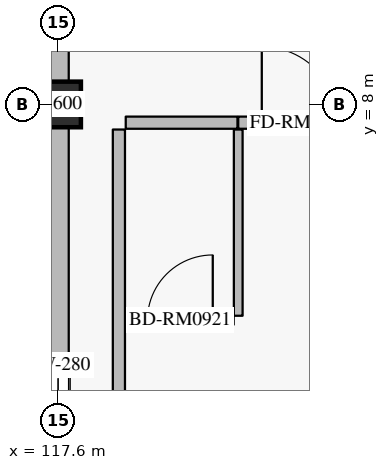
"""IFC4 building model, lengths in metres.
Left out: names, types, materials, properties, quantities, classifications, styles, units other than length and angle.
Written with IfcOpenShell. Run it as: python <this file> out.ifc"""

import sys

from ifc_helpers import new_model, si_unit, direction, frame, frame_2d, origin, origin_2d, place, context, subcontext, project, spatial, rectangle, extrude, element, fill, save


model = new_model("IFC4")
c1 = context("Model", 3, precision=1e-05, world=origin(), true_north=direction((0.0, 1.0)))
c2 = subcontext(c1, "Body", "Model", "MODEL_VIEW")
j1 = project(units=[si_unit("LENGTHUNIT", "METRE"), si_unit("PLANEANGLEUNIT", "RADIAN")], contexts=[c1])
p1 = place(None, origin())
s1 = spatial("IfcSite", under=j1, at=p1, CompositionType="ELEMENT")
p2 = place(p1, origin())
s2 = spatial("IfcBuilding", under=s1, at=p2, CompositionType="ELEMENT")
p3 = place(p2, frame((0.0, 0.0, 36.0)))
s3 = spatial("IfcBuildingStorey", under=s2, at=p3, CompositionType="ELEMENT", Elevation=36.0)
p4 = place(p3, frame((117.6, 8.0, 0.0), z_axis=(0.0, 0.0, 1.0), x_axis=(1.0, 0.0, 0.0)))
e1 = element("IfcColumn", 1, at=p4, inside=s3, PredefinedType="COLUMN", context=c2, shape_type="SweptSolid", body=[
    extrude(rectangle(XDim=0.6, YDim=0.6, at=origin_2d()), origin(), (0.0, 0.0, 1.0), 3.6),
])
p5 = place(p3, frame((117.6, 0.35, 0.0), z_axis=(0.0, 0.0, 1.0), x_axis=(0.0, 1.0, 0.0)))
e2 = element("IfcWall", 2, at=p5, inside=s3, PredefinedType="SOLIDWALL", context=c2, shape_type="SweptSolid", body=[
    extrude(rectangle(XDim=7.35, YDim=0.28, at=frame_2d((3.675, 0.0))), origin(), (0.0, 0.0, 1.0), 2.7),
])
p6 = place(p5, frame((3.025, 0.0, 0.5)))
e3 = element("IfcOpeningElement", 3, at=p6, cuts=e2, PredefinedType="OPENING", context=c2, shape_type="SweptSolid", body=[
    extrude(rectangle(XDim=1.3, YDim=1.65, at=frame_2d((0.65, 0.825))), frame((0.0, 0.15, 0.0), z_axis=(0.0, -1.0, 0.0), x_axis=(1.0, 0.0, 0.0)), (0.0, 0.0, 1.0), 0.3),
])
p7 = place(p3, frame((117.6, 8.3, 0.0), z_axis=(0.0, 0.0, 1.0), x_axis=(0.0, 1.0, 0.0)))
e4 = element("IfcWall", 4, at=p7, inside=s3, PredefinedType="SOLIDWALL", context=c2, shape_type="SweptSolid", body=[
    extrude(rectangle(XDim=7.35, YDim=0.28, at=frame_2d((3.675, 0.0))), origin(), (0.0, 0.0, 1.0), 2.7),
])
p8 = place(p7, frame((3.025, 0.0, 0.5)))
e5 = element("IfcOpeningElement", 5, at=p8, cuts=e4, PredefinedType="OPENING", context=c2, shape_type="SweptSolid", body=[
    extrude(rectangle(XDim=1.3, YDim=1.65, at=frame_2d((0.65, 0.825))), frame((0.0, 0.15, 0.0), z_axis=(0.0, -1.0, 0.0), x_axis=(1.0, 0.0, 0.0)), (0.0, 0.0, 1.0), 0.3),
])
p9 = place(p3, frame((118.49, 7.76, 0.0), z_axis=(0.0, 0.0, 1.0), x_axis=(1.0, 0.0, 0.0)))
e6 = element("IfcWall", 6, at=p9, inside=s3, PredefinedType="PARTITIONING", context=c2, shape_type="SweptSolid", body=[
    extrude(rectangle(XDim=1.47, YDim=0.16, at=frame_2d((0.735, 0.0))), origin(), (0.0, 0.0, 1.0), 3.365),
])
p10 = place(p3, frame((119.97, 7.76, 0.0), z_axis=(0.0, 0.0, 1.0), x_axis=(1.0, 0.0, 0.0)))
e7 = element("IfcWall", 7, at=p10, inside=s3, PredefinedType="PARTITIONING", context=c2, shape_type="SweptSolid", body=[
    extrude(rectangle(XDim=1.62, YDim=0.16, at=frame_2d((0.81, 0.0))), origin(), (0.0, 0.0, 1.0), 3.365),
])
p11 = place(p10, frame((0.31, 0.0, 0.0)))
e8 = element("IfcOpeningElement", 8, at=p11, cuts=e7, PredefinedType="OPENING", context=c2, shape_type="SweptSolid", body=[
    extrude(rectangle(XDim=1.0, YDim=2.25, at=frame_2d((0.5, 1.125))), frame((0.0, 0.09, 0.0), z_axis=(0.0, -1.0, 0.0), x_axis=(1.0, 0.0, 0.0)), (0.0, 0.0, 1.0), 0.18),
])
p12 = place(p3, frame((119.97, 5.22, 0.0), z_axis=(0.0, 0.0, 1.0), x_axis=(0.0, 1.0, 0.0)))
e9 = element("IfcWall", 9, at=p12, inside=s3, PredefinedType="PARTITIONING", context=c2, shape_type="SweptSolid", body=[
    extrude(rectangle(XDim=2.45, YDim=0.115, at=frame_2d((1.225, 0.0))), origin(), (0.0, 0.0, 1.0), 3.365),
])
p13 = place(p3, frame((118.5, 5.16, 0.0), z_axis=(0.0, 0.0, 1.0), x_axis=(1.0, 0.0, 0.0)))
e10 = element("IfcWall", 10, at=p13, inside=s3, PredefinedType="PARTITIONING", context=c2, shape_type="SweptSolid", body=[
    extrude(rectangle(XDim=1.41, YDim=0.115, at=frame_2d((0.705, 0.0))), origin(), (0.0, 0.0, 1.0), 3.365),
])
p14 = place(p13, frame((0.275, 0.0, 0.0)))
e11 = element("IfcOpeningElement", 11, at=p14, cuts=e10, PredefinedType="OPENING", context=c2, shape_type="SweptSolid", body=[
    extrude(rectangle(XDim=0.86, YDim=2.12, at=frame_2d((0.43, 1.06))), frame((0.0, 0.067, 0.0), z_axis=(0.0, -1.0, 0.0), x_axis=(1.0, 0.0, 0.0)), (0.0, 0.0, 1.0), 0.135),
])
p15 = place(p3, frame((118.4, 0.34, 0.0), z_axis=(0.0, 0.0, 1.0), x_axis=(0.0, 1.0, 0.0)))
e12 = element("IfcWall", 12, at=p15, inside=s3, PredefinedType="PARTITIONING", context=c2, shape_type="SweptSolid", body=[
    extrude(rectangle(XDim=7.33, YDim=0.16, at=frame_2d((3.665, 0.0))), origin(), (0.0, 0.0, 1.0), 3.365),
])
p16 = place(p6, origin())
e13 = element("IfcWindow", 13, at=p16, inside=s3, PartitioningType="SINGLE_PANEL", PredefinedType="WINDOW", context=c2, shape_type="SweptSolid", body=[
    extrude(rectangle(XDim=1.3, YDim=1.65, at=frame_2d((0.65, 0.825))), frame((0.0, 0.03, 0.0), z_axis=(0.0, -1.0, 0.0), x_axis=(1.0, 0.0, 0.0)), (0.0, 0.0, 1.0), 0.06),
])
fill(e3, e13)
p17 = place(p11, origin())
e14 = element("IfcDoor", 14, at=p17, inside=s3, OperationType="SINGLE_SWING_LEFT", PredefinedType="DOOR", context=c2, shape_type="SweptSolid", body=[
    extrude(rectangle(XDim=1.0, YDim=2.25, at=frame_2d((0.5, 1.125))), frame((0.0, 0.025, 0.0), z_axis=(0.0, -1.0, 0.0), x_axis=(1.0, 0.0, 0.0)), (0.0, 0.0, 1.0), 0.05),
])
fill(e8, e14)
p18 = place(p14, origin())
e15 = element("IfcDoor", 15, at=p18, inside=s3, OperationType="SINGLE_SWING_RIGHT", PredefinedType="DOOR", context=c2, shape_type="SweptSolid", body=[
    extrude(rectangle(XDim=0.86, YDim=2.12, at=frame_2d((0.43, 1.06))), frame((0.0, 0.025, 0.0), z_axis=(0.0, -1.0, 0.0), x_axis=(1.0, 0.0, 0.0)), (0.0, 0.0, 1.0), 0.05),
])
fill(e11, e15)
save(model, sys.argv[1])
